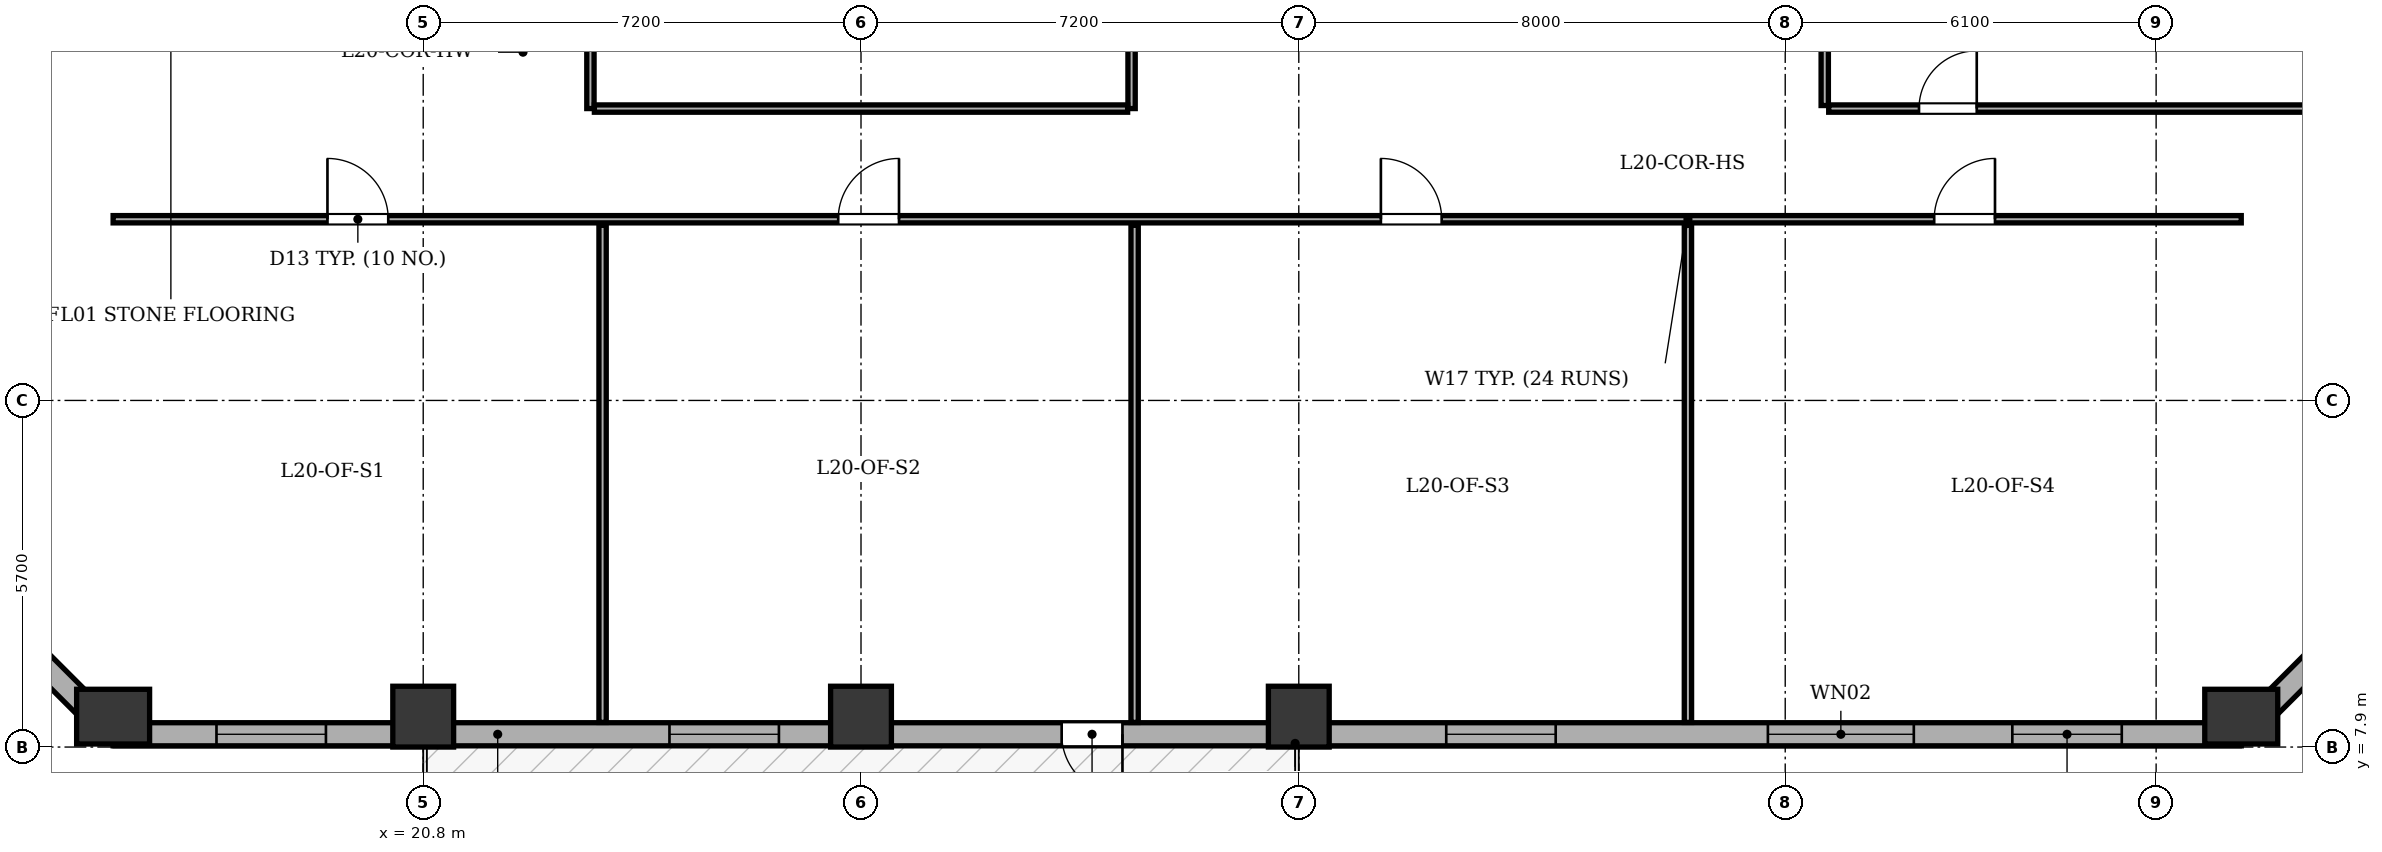
"""IFC4 building model, lengths in metres.
Left out: names, types, materials, properties, quantities, classifications, styles, units other than length and angle.
Written with IfcOpenShell. Run it as: python <this file> out.ifc"""

import sys

from ifc_helpers import new_model, si_unit, direction, frame, frame_2d, origin, origin_2d, place, context, subcontext, project, spatial, rectangle, extrude, element, fill, save


model = new_model("IFC4")
c1 = context("Model", 3, precision=1e-05, world=origin(), true_north=direction((0.0, 1.0)))
c2 = subcontext(c1, "Body", "Model", "MODEL_VIEW")
j1 = project(units=[si_unit("LENGTHUNIT", "METRE"), si_unit("PLANEANGLEUNIT", "RADIAN")], contexts=[c1])
p1 = place(None, origin())
s1 = spatial("IfcSite", under=j1, at=p1, CompositionType="ELEMENT")
p2 = place(p1, origin())
s2 = spatial("IfcBuilding", under=s1, at=p2, CompositionType="ELEMENT")
p3 = place(p2, frame((0.0, 0.0, 82.8)))
s3 = spatial("IfcBuildingStorey", under=s2, at=p3, CompositionType="ELEMENT", Elevation=82.8)
p4 = place(p3, frame((15.7, 8.4, 0.0), z_axis=(0.0, 0.0, 1.0), x_axis=(1.0, 0.0, 0.0)))
e1 = element("IfcColumn", 1, at=p4, inside=s3, PredefinedType="COLUMN", context=c2, shape_type="SweptSolid", body=[
    extrude(rectangle(XDim=0.9, YDim=1.2, at=origin_2d()), origin(), (0.0, 0.0, 1.0), 3.9),
])
for number, where, z_axis, x_axis in (
    (2, (20.8, 8.4, 0.0), (0.0, 0.0, 1.0), (1.0, 0.0, 0.0)),
    (3, (28.0, 8.4, 0.0), (0.0, 0.0, 1.0), (1.0, 0.0, 0.0)),
    (4, (35.2, 8.4, 0.0), (0.0, 0.0, 1.0), (1.0, 0.0, 0.0)),
):
    element("IfcColumn", number, at=place(p3, frame(where, z_axis=z_axis, x_axis=x_axis)), inside=s3, PredefinedType="COLUMN", context=c2, shape_type="SweptSolid", body=[
        extrude(rectangle(XDim=1.0, YDim=1.0, at=origin_2d()), origin(), (0.0, 0.0, 1.0), 3.9),
    ])
p5 = place(p3, frame((50.7, 8.4, 0.0), z_axis=(0.0, 0.0, 1.0), x_axis=(1.0, 0.0, 0.0)))
e5 = element("IfcColumn", 5, at=p5, inside=s3, PredefinedType="COLUMN", context=c2, shape_type="SweptSolid", body=[
    extrude(rectangle(XDim=0.9, YDim=1.2, at=origin_2d()), origin(), (0.0, 0.0, 1.0), 3.9),
])
p6 = place(p3, frame((50.7, 8.11, 0.0), z_axis=(0.0, 0.0, 1.0), x_axis=(-1.0, 0.0, 0.0)))
e6 = element("IfcWall", 6, at=p6, inside=s3, PredefinedType="STANDARD", context=c2, shape_type="SweptSolid", body=[
    extrude(rectangle(XDim=35.0, YDim=0.38, at=frame_2d((17.5, 0.0))), origin(), (0.0, 0.0, 1.0), 3.135),
])
p7 = place(p6, frame((18.4, 0.0, 0.0)))
e7 = element("IfcOpeningElement", 7, at=p7, cuts=e6, PredefinedType="OPENING", context=c2, shape_type="SweptSolid", body=[
    extrude(rectangle(XDim=1.0, YDim=2.02, at=frame_2d((0.5, 1.01))), frame((0.0, 0.2, 0.0), z_axis=(0.0, -1.0, 0.0), x_axis=(1.0, 0.0, 0.0)), (0.0, 0.0, 1.0), 0.4),
])
p8 = place(p6, frame((1.965, 0.0, 0.8)))
e8 = element("IfcOpeningElement", 8, at=p8, cuts=e6, PredefinedType="OPENING", context=c2, shape_type="SweptSolid", body=[
    extrude(rectangle(XDim=1.8, YDim=1.9, at=frame_2d((0.9, 0.95))), frame((0.0, 0.2, 0.0), z_axis=(0.0, -1.0, 0.0), x_axis=(1.0, 0.0, 0.0)), (0.0, 0.0, 1.0), 0.4),
])
p9 = place(p6, frame((5.385, 0.0, 0.8)))
e9 = element("IfcOpeningElement", 9, at=p9, cuts=e6, PredefinedType="OPENING", context=c2, shape_type="SweptSolid", body=[
    extrude(rectangle(XDim=2.4, YDim=1.9, at=frame_2d((1.2, 0.95))), frame((0.0, 0.2, 0.0), z_axis=(0.0, -1.0, 0.0), x_axis=(1.0, 0.0, 0.0)), (0.0, 0.0, 1.0), 0.4),
])
p10 = place(p6, frame((11.275, 0.0, 0.8)))
e10 = element("IfcOpeningElement", 10, at=p10, cuts=e6, PredefinedType="OPENING", context=c2, shape_type="SweptSolid", body=[
    extrude(rectangle(XDim=1.8, YDim=1.9, at=frame_2d((0.9, 0.95))), frame((0.0, 0.2, 0.0), z_axis=(0.0, -1.0, 0.0), x_axis=(1.0, 0.0, 0.0)), (0.0, 0.0, 1.0), 0.4),
])
p11 = place(p6, frame((24.05, 0.0, 0.8)))
e11 = element("IfcOpeningElement", 11, at=p11, cuts=e6, PredefinedType="OPENING", context=c2, shape_type="SweptSolid", body=[
    extrude(rectangle(XDim=1.8, YDim=1.9, at=frame_2d((0.9, 0.95))), frame((0.0, 0.2, 0.0), z_axis=(0.0, -1.0, 0.0), x_axis=(1.0, 0.0, 0.0)), (0.0, 0.0, 1.0), 0.4),
])
p12 = place(p6, frame((31.5, 0.0, 0.8)))
e12 = element("IfcOpeningElement", 12, at=p12, cuts=e6, PredefinedType="OPENING", context=c2, shape_type="SweptSolid", body=[
    extrude(rectangle(XDim=1.8, YDim=1.9, at=frame_2d((0.9, 0.95))), frame((0.0, 0.2, 0.0), z_axis=(0.0, -1.0, 0.0), x_axis=(1.0, 0.0, 0.0)), (0.0, 0.0, 1.0), 0.4),
])
p13 = place(p3, frame((15.7, 8.11, 0.0), z_axis=(0.0, 0.0, 1.0), x_axis=(-0.707124801467, 0.707088760447, 0.0)))
e13 = element("IfcWall", 13, at=p13, inside=s3, PredefinedType="STANDARD", context=c2, shape_type="SweptSolid", body=[
    extrude(rectangle(XDim=6.774, YDim=0.38, at=frame_2d((3.387, 0.0))), origin(), (0.0, 0.0, 1.0), 3.135),
])
p14 = place(p13, frame((2.687, 0.0, 0.8)))
e14 = element("IfcOpeningElement", 14, at=p14, cuts=e13, PredefinedType="OPENING", context=c2, shape_type="SweptSolid", body=[
    extrude(rectangle(XDim=1.4, YDim=1.65, at=frame_2d((0.7, 0.825))), frame((0.0, 0.2, 0.0), z_axis=(0.0, -1.0, 0.0), x_axis=(1.0, 0.0, 0.0)), (0.0, 0.0, 1.0), 0.4),
])
p15 = place(p3, frame((55.49, 12.9, 0.0), z_axis=(0.0, 0.0, 1.0), x_axis=(-0.707124801467, -0.707088760447, 0.0)))
e15 = element("IfcWall", 15, at=p15, inside=s3, PredefinedType="STANDARD", context=c2, shape_type="SweptSolid", body=[
    extrude(rectangle(XDim=6.774, YDim=0.38, at=frame_2d((3.387, 0.0))), origin(), (0.0, 0.0, 1.0), 3.135),
])
p16 = place(p15, frame((2.687, 0.0, 0.8)))
e16 = element("IfcOpeningElement", 16, at=p16, cuts=e15, PredefinedType="OPENING", context=c2, shape_type="SweptSolid", body=[
    extrude(rectangle(XDim=1.4, YDim=1.65, at=frame_2d((0.7, 0.825))), frame((0.0, 0.2, 0.0), z_axis=(0.0, -1.0, 0.0), x_axis=(1.0, 0.0, 0.0)), (0.0, 0.0, 1.0), 0.4),
])
for number, where, z_axis, x_axis in (
    (17, (23.55, 18.4, 0.0), (0.0, 0.0, 1.0), (0.0, 1.0, 0.0)),
    (18, (32.45, 18.4, 0.0), (0.0, 0.0, 1.0), (0.0, 1.0, 0.0)),
):
    element("IfcWall", number, at=place(p3, frame(where, z_axis=z_axis, x_axis=x_axis)), inside=s3, PredefinedType="PARTITIONING", context=c2, shape_type="SweptSolid", body=[
        extrude(rectangle(XDim=3.485, YDim=0.12, at=frame_2d((1.743, 0.0))), origin(), (0.0, 0.0, 1.0), 3.6),
    ])
p17 = place(p3, frame((23.615, 18.4, 0.0), z_axis=(0.0, 0.0, 1.0), x_axis=(1.0, 0.0, 0.0)))
e19 = element("IfcWall", 19, at=p17, inside=s3, PredefinedType="PARTITIONING", context=c2, shape_type="SweptSolid", body=[
    extrude(rectangle(XDim=8.77, YDim=0.12, at=frame_2d((4.385, 0.0))), origin(), (0.0, 0.0, 1.0), 3.6),
])
p18 = place(p3, frame((15.7, 16.58, 0.0), z_axis=(0.0, 0.0, 1.0), x_axis=(1.0, 0.0, 0.0)))
e20 = element("IfcWall", 20, at=p18, inside=s3, PredefinedType="PARTITIONING", context=c2, shape_type="SweptSolid", body=[
    extrude(rectangle(XDim=35.0, YDim=0.12, at=frame_2d((17.5, 0.0))), origin(), (0.0, 0.0, 1.0), 3.6),
])
p19 = place(p18, frame((3.525, 0.0, 0.0)))
e21 = element("IfcOpeningElement", 21, at=p19, cuts=e20, PredefinedType="OPENING", context=c2, shape_type="SweptSolid", body=[
    extrude(rectangle(XDim=1.0, YDim=2.1, at=frame_2d((0.5, 1.05))), frame((0.0, 0.07, 0.0), z_axis=(0.0, -1.0, 0.0), x_axis=(1.0, 0.0, 0.0)), (0.0, 0.0, 1.0), 0.14),
])
p20 = place(p18, frame((11.925, 0.0, 0.0)))
e22 = element("IfcOpeningElement", 22, at=p20, cuts=e20, PredefinedType="OPENING", context=c2, shape_type="SweptSolid", body=[
    extrude(rectangle(XDim=1.0, YDim=2.1, at=frame_2d((0.5, 1.05))), frame((0.0, 0.07, 0.0), z_axis=(0.0, -1.0, 0.0), x_axis=(1.0, 0.0, 0.0)), (0.0, 0.0, 1.0), 0.14),
])
p21 = place(p18, frame((20.85, 0.0, 0.0)))
e23 = element("IfcOpeningElement", 23, at=p21, cuts=e20, PredefinedType="OPENING", context=c2, shape_type="SweptSolid", body=[
    extrude(rectangle(XDim=1.0, YDim=2.1, at=frame_2d((0.5, 1.05))), frame((0.0, 0.07, 0.0), z_axis=(0.0, -1.0, 0.0), x_axis=(1.0, 0.0, 0.0)), (0.0, 0.0, 1.0), 0.14),
])
p22 = place(p18, frame((29.95, 0.0, 0.0)))
e24 = element("IfcOpeningElement", 24, at=p22, cuts=e20, PredefinedType="OPENING", context=c2, shape_type="SweptSolid", body=[
    extrude(rectangle(XDim=1.0, YDim=2.1, at=frame_2d((0.5, 1.05))), frame((0.0, 0.07, 0.0), z_axis=(0.0, -1.0, 0.0), x_axis=(1.0, 0.0, 0.0)), (0.0, 0.0, 1.0), 0.14),
])
for number, where, z_axis, x_axis in (
    (25, (23.75, 8.305, 0.0), (0.0, 0.0, 1.0), (0.0, 1.0, 0.0)),
    (26, (32.5, 8.305, 0.0), (0.0, 0.0, 1.0), (0.0, 1.0, 0.0)),
    (27, (41.6, 8.305, 0.0), (0.0, 0.0, 1.0), (0.0, 1.0, 0.0)),
):
    element("IfcWall", number, at=place(p3, frame(where, z_axis=z_axis, x_axis=x_axis)), inside=s3, PredefinedType="PARTITIONING", context=c2, shape_type="SweptSolid", body=[
        extrude(rectangle(XDim=8.175, YDim=0.12, at=frame_2d((4.087, 0.0))), origin(), (0.0, 0.0, 1.0), 3.6),
    ])
p23 = place(p3, frame((43.85, 18.45, 0.0), z_axis=(0.0, 0.0, 1.0), x_axis=(0.0, 1.0, 0.0)))
e28 = element("IfcWall", 28, at=p23, inside=s3, PredefinedType="PARTITIONING", context=c2, shape_type="SweptSolid", body=[
    extrude(rectangle(XDim=17.5, YDim=0.12, at=frame_2d((8.75, 0.0))), origin(), (0.0, 0.0, 1.0), 3.6),
])
p24 = place(p3, frame((43.915, 18.4, 0.0), z_axis=(0.0, 0.0, 1.0), x_axis=(1.0, 0.0, 0.0)))
e29 = element("IfcWall", 29, at=p24, inside=s3, PredefinedType="PARTITIONING", context=c2, shape_type="SweptSolid", body=[
    extrude(rectangle(XDim=11.38, YDim=0.12, at=frame_2d((5.69, 0.0))), origin(), (0.0, 0.0, 1.0), 3.6),
])
p25 = place(p24, frame((1.485, 0.0, 0.0)))
e30 = element("IfcOpeningElement", 30, at=p25, cuts=e29, PredefinedType="OPENING", context=c2, shape_type="SweptSolid", body=[
    extrude(rectangle(XDim=0.95, YDim=2.1, at=frame_2d((0.475, 1.05))), frame((0.0, 0.07, 0.0), z_axis=(0.0, -1.0, 0.0), x_axis=(1.0, 0.0, 0.0)), (0.0, 0.0, 1.0), 0.14),
])
p26 = place(p7, origin())
e31 = element("IfcDoor", 31, at=p26, inside=s3, OperationType="SINGLE_SWING_LEFT", PredefinedType="DOOR", context=c2, shape_type="SweptSolid", body=[
    extrude(rectangle(XDim=1.0, YDim=2.02, at=frame_2d((0.5, 1.01))), frame((0.0, 0.025, 0.0), z_axis=(0.0, -1.0, 0.0), x_axis=(1.0, 0.0, 0.0)), (0.0, 0.0, 1.0), 0.05),
])
fill(e7, e31)
p27 = place(p8, origin())
e32 = element("IfcWindow", 32, at=p27, inside=s3, PartitioningType="SINGLE_PANEL", PredefinedType="WINDOW", context=c2, shape_type="SweptSolid", body=[
    extrude(rectangle(XDim=1.8, YDim=1.9, at=frame_2d((0.9, 0.95))), frame((0.0, -0.01, 0.0), z_axis=(0.0, -1.0, 0.0), x_axis=(1.0, 0.0, 0.0)), (0.0, 0.0, 1.0), 0.06),
])
fill(e8, e32)
p28 = place(p9, origin())
e33 = element("IfcWindow", 33, at=p28, inside=s3, PartitioningType="SINGLE_PANEL", PredefinedType="WINDOW", context=c2, shape_type="SweptSolid", body=[
    extrude(rectangle(XDim=2.4, YDim=1.9, at=frame_2d((1.2, 0.95))), frame((0.0, -0.01, 0.0), z_axis=(0.0, -1.0, 0.0), x_axis=(1.0, 0.0, 0.0)), (0.0, 0.0, 1.0), 0.06),
])
fill(e9, e33)
p29 = place(p10, origin())
e34 = element("IfcWindow", 34, at=p29, inside=s3, PartitioningType="SINGLE_PANEL", PredefinedType="WINDOW", context=c2, shape_type="SweptSolid", body=[
    extrude(rectangle(XDim=1.8, YDim=1.9, at=frame_2d((0.9, 0.95))), frame((0.0, -0.01, 0.0), z_axis=(0.0, -1.0, 0.0), x_axis=(1.0, 0.0, 0.0)), (0.0, 0.0, 1.0), 0.06),
])
fill(e10, e34)
p30 = place(p11, origin())
e35 = element("IfcWindow", 35, at=p30, inside=s3, PartitioningType="SINGLE_PANEL", PredefinedType="WINDOW", context=c2, shape_type="SweptSolid", body=[
    extrude(rectangle(XDim=1.8, YDim=1.9, at=frame_2d((0.9, 0.95))), frame((0.0, -0.01, 0.0), z_axis=(0.0, -1.0, 0.0), x_axis=(1.0, 0.0, 0.0)), (0.0, 0.0, 1.0), 0.06),
])
fill(e11, e35)
p31 = place(p12, origin())
e36 = element("IfcWindow", 36, at=p31, inside=s3, PartitioningType="SINGLE_PANEL", PredefinedType="WINDOW", context=c2, shape_type="SweptSolid", body=[
    extrude(rectangle(XDim=1.8, YDim=1.9, at=frame_2d((0.9, 0.95))), frame((0.0, -0.01, 0.0), z_axis=(0.0, -1.0, 0.0), x_axis=(1.0, 0.0, 0.0)), (0.0, 0.0, 1.0), 0.06),
])
fill(e12, e36)
p32 = place(p19, origin())
e37 = element("IfcDoor", 37, at=p32, inside=s3, OperationType="SINGLE_SWING_LEFT", PredefinedType="DOOR", context=c2, shape_type="SweptSolid", body=[
    extrude(rectangle(XDim=1.0, YDim=2.1, at=frame_2d((0.5, 1.05))), frame((0.0, 0.025, 0.0), z_axis=(0.0, -1.0, 0.0), x_axis=(1.0, 0.0, 0.0)), (0.0, 0.0, 1.0), 0.05),
])
fill(e21, e37)
p33 = place(p20, origin())
e38 = element("IfcDoor", 38, at=p33, inside=s3, OperationType="SINGLE_SWING_RIGHT", PredefinedType="DOOR", context=c2, shape_type="SweptSolid", body=[
    extrude(rectangle(XDim=1.0, YDim=2.1, at=frame_2d((0.5, 1.05))), frame((0.0, 0.025, 0.0), z_axis=(0.0, -1.0, 0.0), x_axis=(1.0, 0.0, 0.0)), (0.0, 0.0, 1.0), 0.05),
])
fill(e22, e38)
p34 = place(p21, origin())
e39 = element("IfcDoor", 39, at=p34, inside=s3, OperationType="SINGLE_SWING_LEFT", PredefinedType="DOOR", context=c2, shape_type="SweptSolid", body=[
    extrude(rectangle(XDim=1.0, YDim=2.1, at=frame_2d((0.5, 1.05))), frame((0.0, 0.025, 0.0), z_axis=(0.0, -1.0, 0.0), x_axis=(1.0, 0.0, 0.0)), (0.0, 0.0, 1.0), 0.05),
])
fill(e23, e39)
p35 = place(p22, origin())
e40 = element("IfcDoor", 40, at=p35, inside=s3, OperationType="SINGLE_SWING_RIGHT", PredefinedType="DOOR", context=c2, shape_type="SweptSolid", body=[
    extrude(rectangle(XDim=1.0, YDim=2.1, at=frame_2d((0.5, 1.05))), frame((0.0, 0.025, 0.0), z_axis=(0.0, -1.0, 0.0), x_axis=(1.0, 0.0, 0.0)), (0.0, 0.0, 1.0), 0.05),
])
fill(e24, e40)
p36 = place(p25, origin())
e41 = element("IfcDoor", 41, at=p36, inside=s3, OperationType="SINGLE_SWING_RIGHT", PredefinedType="DOOR", context=c2, shape_type="SweptSolid", body=[
    extrude(rectangle(XDim=0.95, YDim=2.1, at=frame_2d((0.475, 1.05))), frame((0.0, 0.025, 0.0), z_axis=(0.0, -1.0, 0.0), x_axis=(1.0, 0.0, 0.0)), (0.0, 0.0, 1.0), 0.05),
])
fill(e30, e41)
save(model, sys.argv[1])
